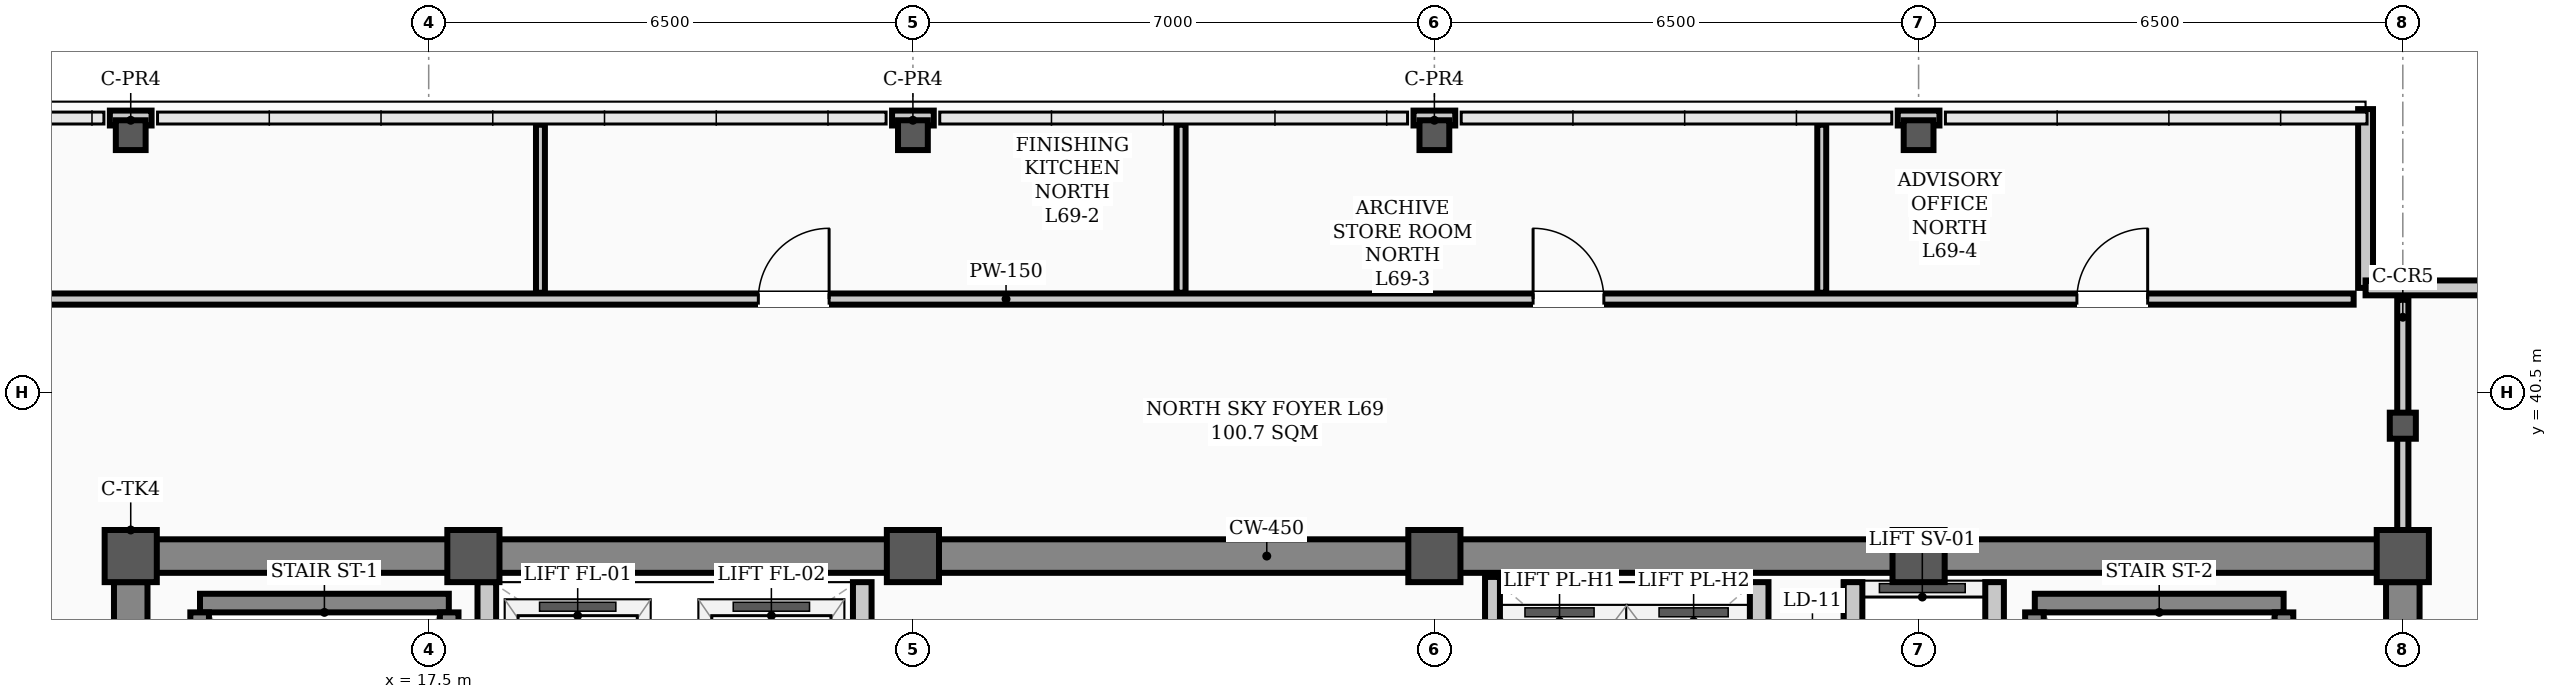
"""IFC4 building model, lengths in metres.
Left out: names, types, materials, properties, quantities, classifications, styles, units other than length and angle.
Written with IfcOpenShell. Run it as: python <this file> out.ifc"""

import sys

from ifc_helpers import new_model, si_unit, direction, frame, frame_2d, origin, origin_2d, place, context, subcontext, project, spatial, rectangle, hollow_rectangle, extrude, element, fill, save


model = new_model("IFC4")
c1 = context("Model", 3, precision=1e-05, world=origin(), true_north=direction((0.0, 1.0)))
c2 = subcontext(c1, "Body", "Model", "MODEL_VIEW")
j1 = project(units=[si_unit("LENGTHUNIT", "METRE"), si_unit("PLANEANGLEUNIT", "RADIAN")], contexts=[c1])
p1 = place(None, origin())
s1 = spatial("IfcSite", under=j1, at=p1, CompositionType="ELEMENT")
p2 = place(p1, origin())
s2 = spatial("IfcBuilding", under=s1, at=p2, CompositionType="ELEMENT")
p3 = place(p2, frame((0.0, 0.0, 277.4)))
s3 = spatial("IfcBuildingStorey", under=s2, at=p3, CompositionType="ELEMENT", Elevation=277.4)
for number, where, z_axis, x_axis in (
    (1, (13.5, 38.3, 0.0), (0.0, 0.0, 1.0), (1.0, 0.0, 0.0)),
    (2, (18.1, 38.3, 0.0), (0.0, 0.0, 1.0), (1.0, 0.0, 0.0)),
    (3, (24.0, 38.3, 0.0), (0.0, 0.0, 1.0), (1.0, 0.0, 0.0)),
    (4, (31.0, 38.3, 0.0), (0.0, 0.0, 1.0), (1.0, 0.0, 0.0)),
    (5, (37.5, 38.3, 0.0), (0.0, 0.0, 1.0), (1.0, 0.0, 0.0)),
    (6, (44.0, 38.3, 0.0), (0.0, 0.0, 1.0), (1.0, 0.0, 0.0)),
):
    element("IfcColumn", number, at=place(p3, frame(where, z_axis=z_axis, x_axis=x_axis)), inside=s3, PredefinedType="COLUMN", context=c2, shape_type="SweptSolid", body=[
        extrude(hollow_rectangle(XDim=0.7, YDim=0.7, WallThickness=0.028, InnerFilletRadius=0.014, OuterFilletRadius=0.042, at=origin_2d()), origin(), (0.0, 0.0, 1.0), 3.9),
    ])
for number, where, z_axis, x_axis in (
    (7, (13.5, 43.95, 0.0), (0.0, 0.0, 1.0), (1.0, 0.0, 0.0)),
    (8, (24.0, 43.95, 0.0), (0.0, 0.0, 1.0), (1.0, 0.0, 0.0)),
    (9, (31.0, 43.95, 0.0), (0.0, 0.0, 1.0), (1.0, 0.0, 0.0)),
    (10, (37.5, 43.95, 0.0), (0.0, 0.0, 1.0), (1.0, 0.0, 0.0)),
):
    element("IfcColumn", number, at=place(p3, frame(where, z_axis=z_axis, x_axis=x_axis)), inside=s3, PredefinedType="COLUMN", context=c2, shape_type="SweptSolid", body=[
        extrude(hollow_rectangle(XDim=0.4, YDim=0.4, WallThickness=0.02, InnerFilletRadius=0.02, OuterFilletRadius=0.04, at=origin_2d()), origin(), (0.0, 0.0, 1.0), 3.66),
    ])
p4 = place(p3, frame((44.0, 40.05, -0.2), z_axis=(0.0, 0.340931357597, 0.940088192356), x_axis=(-1.0, 0.0, 0.0)))
e11 = element("IfcColumn", 11, at=p4, inside=s3, PredefinedType="COLUMN", context=c2, shape_type="SweptSolid", body=[
    extrude(hollow_rectangle(XDim=0.35, YDim=0.35, WallThickness=0.016, InnerFilletRadius=0.016, OuterFilletRadius=0.032, at=origin_2d()), origin(), (0.0, 0.0, 1.0), 4.106),
])
for number, where, z_axis, x_axis in (
    (12, (13.22, 44.18, 0.0), (0.0, 0.0, 1.0), (1.0, 0.0, 0.0)),
    (13, (23.72, 44.18, 0.0), (0.0, 0.0, 1.0), (1.0, 0.0, 0.0)),
    (14, (30.72, 44.18, 0.0), (0.0, 0.0, 1.0), (1.0, 0.0, 0.0)),
    (15, (37.22, 44.18, 0.0), (0.0, 0.0, 1.0), (1.0, 0.0, 0.0)),
):
    element("IfcWall", number, at=place(p3, frame(where, z_axis=z_axis, x_axis=x_axis)), inside=s3, PredefinedType="PARAPET", context=c2, shape_type="SweptSolid", body=[
        extrude(rectangle(XDim=0.56, YDim=0.2, at=frame_2d((0.28, 0.0))), origin(), (0.0, 0.0, 1.0), 1.2),
    ])
p5 = place(p3, frame((43.5, 44.3, 0.0), z_axis=(0.0, 0.0, 1.0), x_axis=(0.0, -1.0, 0.0)))
e16 = element("IfcWall", 16, at=p5, inside=s3, PredefinedType="PARAPET", context=c2, shape_type="SweptSolid", body=[
    extrude(rectangle(XDim=2.4, YDim=0.2, at=frame_2d((1.2, 0.0))), origin(), (0.0, 0.0, 1.0), 1.2),
])
p6 = place(p3, frame((43.5, 41.9, 0.0), z_axis=(0.0, 0.0, 1.0), x_axis=(1.0, 0.0, 0.0)))
e17 = element("IfcWall", 17, at=p6, inside=s3, PredefinedType="PARAPET", context=c2, shape_type="SweptSolid", body=[
    extrude(rectangle(XDim=2.4, YDim=0.2, at=frame_2d((1.2, 0.0))), origin(), (0.0, 0.0, 1.0), 1.2),
])
p7 = place(p3, frame((13.5, 38.3, 0.0), z_axis=(0.0, 0.0, 1.0), x_axis=(1.0, 0.0, 0.0)))
e18 = element("IfcWall", 18, at=p7, inside=s3, PredefinedType="SHEAR", context=c2, shape_type="SweptSolid", body=[
    extrude(rectangle(XDim=30.5, YDim=0.45, at=frame_2d((15.25, 0.0))), origin(), (0.0, 0.0, 1.0), 3.66),
])
for number, where, z_axis, x_axis in (
    (19, (13.5, 29.35, 0.0), (0.0, 0.0, 1.0), (0.0, 1.0, 0.0)),
    (20, (44.0, 29.35, 0.0), (0.0, 0.0, 1.0), (0.0, 1.0, 0.0)),
):
    element("IfcWall", number, at=place(p3, frame(where, z_axis=z_axis, x_axis=x_axis)), inside=s3, PredefinedType="SHEAR", context=c2, shape_type="SweptSolid", body=[
        extrude(rectangle(XDim=8.6, YDim=0.45, at=frame_2d((4.3, 0.0))), origin(), (0.0, 0.0, 1.0), 3.66),
    ])
p8 = place(p3, frame((14.43, 37.669, 0.0), z_axis=(0.0, 0.0, 1.0), x_axis=(1.0, 0.0, 0.0)))
e21 = element("IfcWall", 21, at=p8, inside=s3, PredefinedType="STANDARD", context=c2, shape_type="SweptSolid", body=[
    extrude(rectangle(XDim=3.34, YDim=0.25, at=frame_2d((1.67, 0.0))), origin(), (0.0, 0.0, 1.0), 3.66),
])
for number, where, z_axis, x_axis in (
    (22, (14.425, 30.36, 0.0), (0.0, 0.0, 1.0), (0.0, 1.0, 0.0)),
    (23, (17.775, 30.36, 0.0), (0.0, 0.0, 1.0), (0.0, 1.0, 0.0)),
):
    element("IfcWall", number, at=place(p3, frame(where, z_axis=z_axis, x_axis=x_axis)), inside=s3, PredefinedType="STANDARD", context=c2, shape_type="SweptSolid", body=[
        extrude(rectangle(XDim=7.184, YDim=0.25, at=frame_2d((3.592, 0.0))), origin(), (0.0, 0.0, 1.0), 3.66),
    ])
p9 = place(p3, frame((39.06, 37.669, 0.0), z_axis=(0.0, 0.0, 1.0), x_axis=(1.0, 0.0, 0.0)))
e24 = element("IfcWall", 24, at=p9, inside=s3, PredefinedType="STANDARD", context=c2, shape_type="SweptSolid", body=[
    extrude(rectangle(XDim=3.34, YDim=0.25, at=frame_2d((1.67, 0.0))), origin(), (0.0, 0.0, 1.0), 3.66),
])
for number, where, z_axis, x_axis in (
    (25, (39.055, 30.36, 0.0), (0.0, 0.0, 1.0), (0.0, 1.0, 0.0)),
    (26, (42.405, 30.36, 0.0), (0.0, 0.0, 1.0), (0.0, 1.0, 0.0)),
):
    element("IfcWall", number, at=place(p3, frame(where, z_axis=z_axis, x_axis=x_axis)), inside=s3, PredefinedType="STANDARD", context=c2, shape_type="SweptSolid", body=[
        extrude(rectangle(XDim=7.184, YDim=0.25, at=frame_2d((3.592, 0.0))), origin(), (0.0, 0.0, 1.0), 3.66),
    ])
p10 = place(p3, frame((36.62, 31.95, 0.0), z_axis=(0.0, 0.0, 1.0), x_axis=(0.0, 1.0, 0.0)))
e27 = element("IfcWall", 27, at=p10, inside=s3, PredefinedType="STANDARD", context=c2, shape_type="SweptSolid", body=[
    extrude(rectangle(XDim=6.0, YDim=0.25, at=frame_2d((3.0, 0.0))), origin(), (0.0, 0.0, 1.0), 2.24),
])
p11 = place(p10, frame((0.9, 0.0, 0.0)))
e28 = element("IfcOpeningElement", 28, at=p11, cuts=e27, PredefinedType="OPENING", context=c2, shape_type="SweptSolid", body=[
    extrude(rectangle(XDim=1.1, YDim=2.08, at=frame_2d((0.55, 1.04))), frame((0.0, 0.135, 0.0), z_axis=(0.0, -1.0, 0.0), x_axis=(1.0, 0.0, 0.0)), (0.0, 0.0, 1.0), 0.27),
])
p12 = place(p10, frame((4.0, 0.0, 0.0)))
e29 = element("IfcOpeningElement", 29, at=p12, cuts=e27, PredefinedType="OPENING", context=c2, shape_type="SweptSolid", body=[
    extrude(rectangle(XDim=1.1, YDim=2.08, at=frame_2d((0.55, 1.04))), frame((0.0, 0.135, 0.0), z_axis=(0.0, -1.0, 0.0), x_axis=(1.0, 0.0, 0.0)), (0.0, 0.0, 1.0), 0.27),
])
p13 = place(p3, frame((38.52, 31.95, 0.0), z_axis=(0.0, 0.0, 1.0), x_axis=(0.0, 1.0, 0.0)))
e30 = element("IfcWall", 30, at=p13, inside=s3, PredefinedType="STANDARD", context=c2, shape_type="SweptSolid", body=[
    extrude(rectangle(XDim=6.0, YDim=0.25, at=frame_2d((3.0, 0.0))), origin(), (0.0, 0.0, 1.0), 2.24),
])
for number, where, z_axis, x_axis in (
    (31, (18.28, 34.62, 0.0), (0.0, 0.0, 1.0), (0.0, 1.0, 0.0)),
    (32, (23.32, 34.62, 0.0), (0.0, 0.0, 1.0), (0.0, 1.0, 0.0)),
):
    element("IfcWall", number, at=place(p3, frame(where, z_axis=z_axis, x_axis=x_axis)), inside=s3, PredefinedType="STANDARD", context=c2, shape_type="SweptSolid", body=[
        extrude(rectangle(XDim=3.33, YDim=0.25, at=frame_2d((1.665, 0.0))), origin(), (0.0, 0.0, 1.0), 3.66),
    ])
p14 = place(p3, frame((35.36, 34.9, 0.0), z_axis=(0.0, 0.0, 1.0), x_axis=(0.0, 1.0, 0.0)))
e33 = element("IfcWall", 33, at=p14, inside=s3, PredefinedType="STANDARD", context=c2, shape_type="SweptSolid", body=[
    extrude(rectangle(XDim=3.05, YDim=0.25, at=frame_2d((1.525, 0.0))), origin(), (0.0, 0.0, 1.0), 2.24),
])
p15 = place(p3, frame((7.16, 41.75, 0.0), z_axis=(0.0, 0.0, 1.0), x_axis=(1.0, 0.0, 0.0)))
e34 = element("IfcWall", 34, at=p15, inside=s3, PredefinedType="PARTITIONING", context=c2, shape_type="SweptSolid", body=[
    extrude(rectangle(XDim=36.18, YDim=0.15, at=frame_2d((18.09, 0.0))), origin(), (0.0, 0.0, 1.0), 2.24),
])
p16 = place(p15, frame((3.855, 0.0, 0.0)))
e35 = element("IfcOpeningElement", 35, at=p16, cuts=e34, PredefinedType="OPENING", context=c2, shape_type="SweptSolid", body=[
    extrude(rectangle(XDim=0.95, YDim=2.08, at=frame_2d((0.475, 1.04))), frame((0.0, 0.085, 0.0), z_axis=(0.0, -1.0, 0.0), x_axis=(1.0, 0.0, 0.0)), (0.0, 0.0, 1.0), 0.17),
])
p17 = place(p15, frame((14.765, 0.0, 0.0)))
e36 = element("IfcOpeningElement", 36, at=p17, cuts=e34, PredefinedType="OPENING", context=c2, shape_type="SweptSolid", body=[
    extrude(rectangle(XDim=0.95, YDim=2.08, at=frame_2d((0.475, 1.04))), frame((0.0, 0.085, 0.0), z_axis=(0.0, -1.0, 0.0), x_axis=(1.0, 0.0, 0.0)), (0.0, 0.0, 1.0), 0.17),
])
p18 = place(p15, frame((25.165, 0.0, 0.0)))
e37 = element("IfcOpeningElement", 37, at=p18, cuts=e34, PredefinedType="OPENING", context=c2, shape_type="SweptSolid", body=[
    extrude(rectangle(XDim=0.95, YDim=2.08, at=frame_2d((0.475, 1.04))), frame((0.0, 0.085, 0.0), z_axis=(0.0, -1.0, 0.0), x_axis=(1.0, 0.0, 0.0)), (0.0, 0.0, 1.0), 0.17),
])
p19 = place(p15, frame((32.465, 0.0, 0.0)))
e38 = element("IfcOpeningElement", 38, at=p19, cuts=e34, PredefinedType="OPENING", context=c2, shape_type="SweptSolid", body=[
    extrude(rectangle(XDim=0.95, YDim=2.08, at=frame_2d((0.475, 1.04))), frame((0.0, 0.085, 0.0), z_axis=(0.0, -1.0, 0.0), x_axis=(1.0, 0.0, 0.0)), (0.0, 0.0, 1.0), 0.17),
])
p20 = place(p3, frame((44.0, 38.535, 0.0), z_axis=(0.0, 0.0, 1.0), x_axis=(0.0, 1.0, 0.0)))
e39 = element("IfcWall", 39, at=p20, inside=s3, PredefinedType="PARTITIONING", context=c2, shape_type="SweptSolid", body=[
    extrude(rectangle(XDim=3.205, YDim=0.15, at=frame_2d((1.603, 0.0))), origin(), (0.0, 0.0, 1.0), 2.24),
])
p21 = place(p3, frame((19.0, 41.835, 0.0), z_axis=(0.0, 0.0, 1.0), x_axis=(0.0, 1.0, 0.0)))
e40 = element("IfcWall", 40, at=p21, inside=s3, PredefinedType="PARTITIONING", context=c2, shape_type="SweptSolid", body=[
    extrude(rectangle(XDim=2.255, YDim=0.12, at=frame_2d((1.127, 0.0))), origin(), (0.0, 0.0, 1.0), 3.66),
])
for number, where, z_axis, x_axis in (
    (41, (27.6, 41.835, 0.0), (0.0, 0.0, 1.0), (0.0, 1.0, 0.0)),
    (42, (36.2, 41.835, 0.0), (0.0, 0.0, 1.0), (0.0, 1.0, 0.0)),
):
    element("IfcWall", number, at=place(p3, frame(where, z_axis=z_axis, x_axis=x_axis)), inside=s3, PredefinedType="PARTITIONING", context=c2, shape_type="SweptSolid", body=[
        extrude(rectangle(XDim=2.255, YDim=0.12, at=frame_2d((1.127, 0.0))), origin(), (0.0, 0.0, 1.0), 2.24),
    ])
p22 = place(p3, frame((31.78, 34.9, 0.0), z_axis=(0.0, 0.0, 1.0), x_axis=(0.0, 1.0, 0.0)))
e43 = element("IfcWall", 43, at=p22, inside=s3, PredefinedType="STANDARD", context=c2, shape_type="SweptSolid", body=[
    extrude(rectangle(XDim=3.12, YDim=0.2, at=frame_2d((1.56, 0.0))), origin(), (0.0, 0.0, 1.0), 2.24),
])
p23 = place(p17, origin())
e44 = element("IfcDoor", 44, at=p23, inside=s3, OperationType="SINGLE_SWING_RIGHT", PredefinedType="DOOR", context=c2, shape_type="SweptSolid", body=[
    extrude(rectangle(XDim=0.95, YDim=2.08, at=frame_2d((0.475, 1.04))), frame((0.0, 0.025, 0.0), z_axis=(0.0, -1.0, 0.0), x_axis=(1.0, 0.0, 0.0)), (0.0, 0.0, 1.0), 0.05),
])
fill(e36, e44)
p24 = place(p18, origin())
e45 = element("IfcDoor", 45, at=p24, inside=s3, OperationType="SINGLE_SWING_LEFT", PredefinedType="DOOR", context=c2, shape_type="SweptSolid", body=[
    extrude(rectangle(XDim=0.95, YDim=2.08, at=frame_2d((0.475, 1.04))), frame((0.0, 0.025, 0.0), z_axis=(0.0, -1.0, 0.0), x_axis=(1.0, 0.0, 0.0)), (0.0, 0.0, 1.0), 0.05),
])
fill(e37, e45)
p25 = place(p19, origin())
e46 = element("IfcDoor", 46, at=p25, inside=s3, OperationType="SINGLE_SWING_RIGHT", PredefinedType="DOOR", context=c2, shape_type="SweptSolid", body=[
    extrude(rectangle(XDim=0.95, YDim=2.08, at=frame_2d((0.475, 1.04))), frame((0.0, 0.025, 0.0), z_axis=(0.0, -1.0, 0.0), x_axis=(1.0, 0.0, 0.0)), (0.0, 0.0, 1.0), 0.05),
])
fill(e38, e46)
save(model, sys.argv[1])
